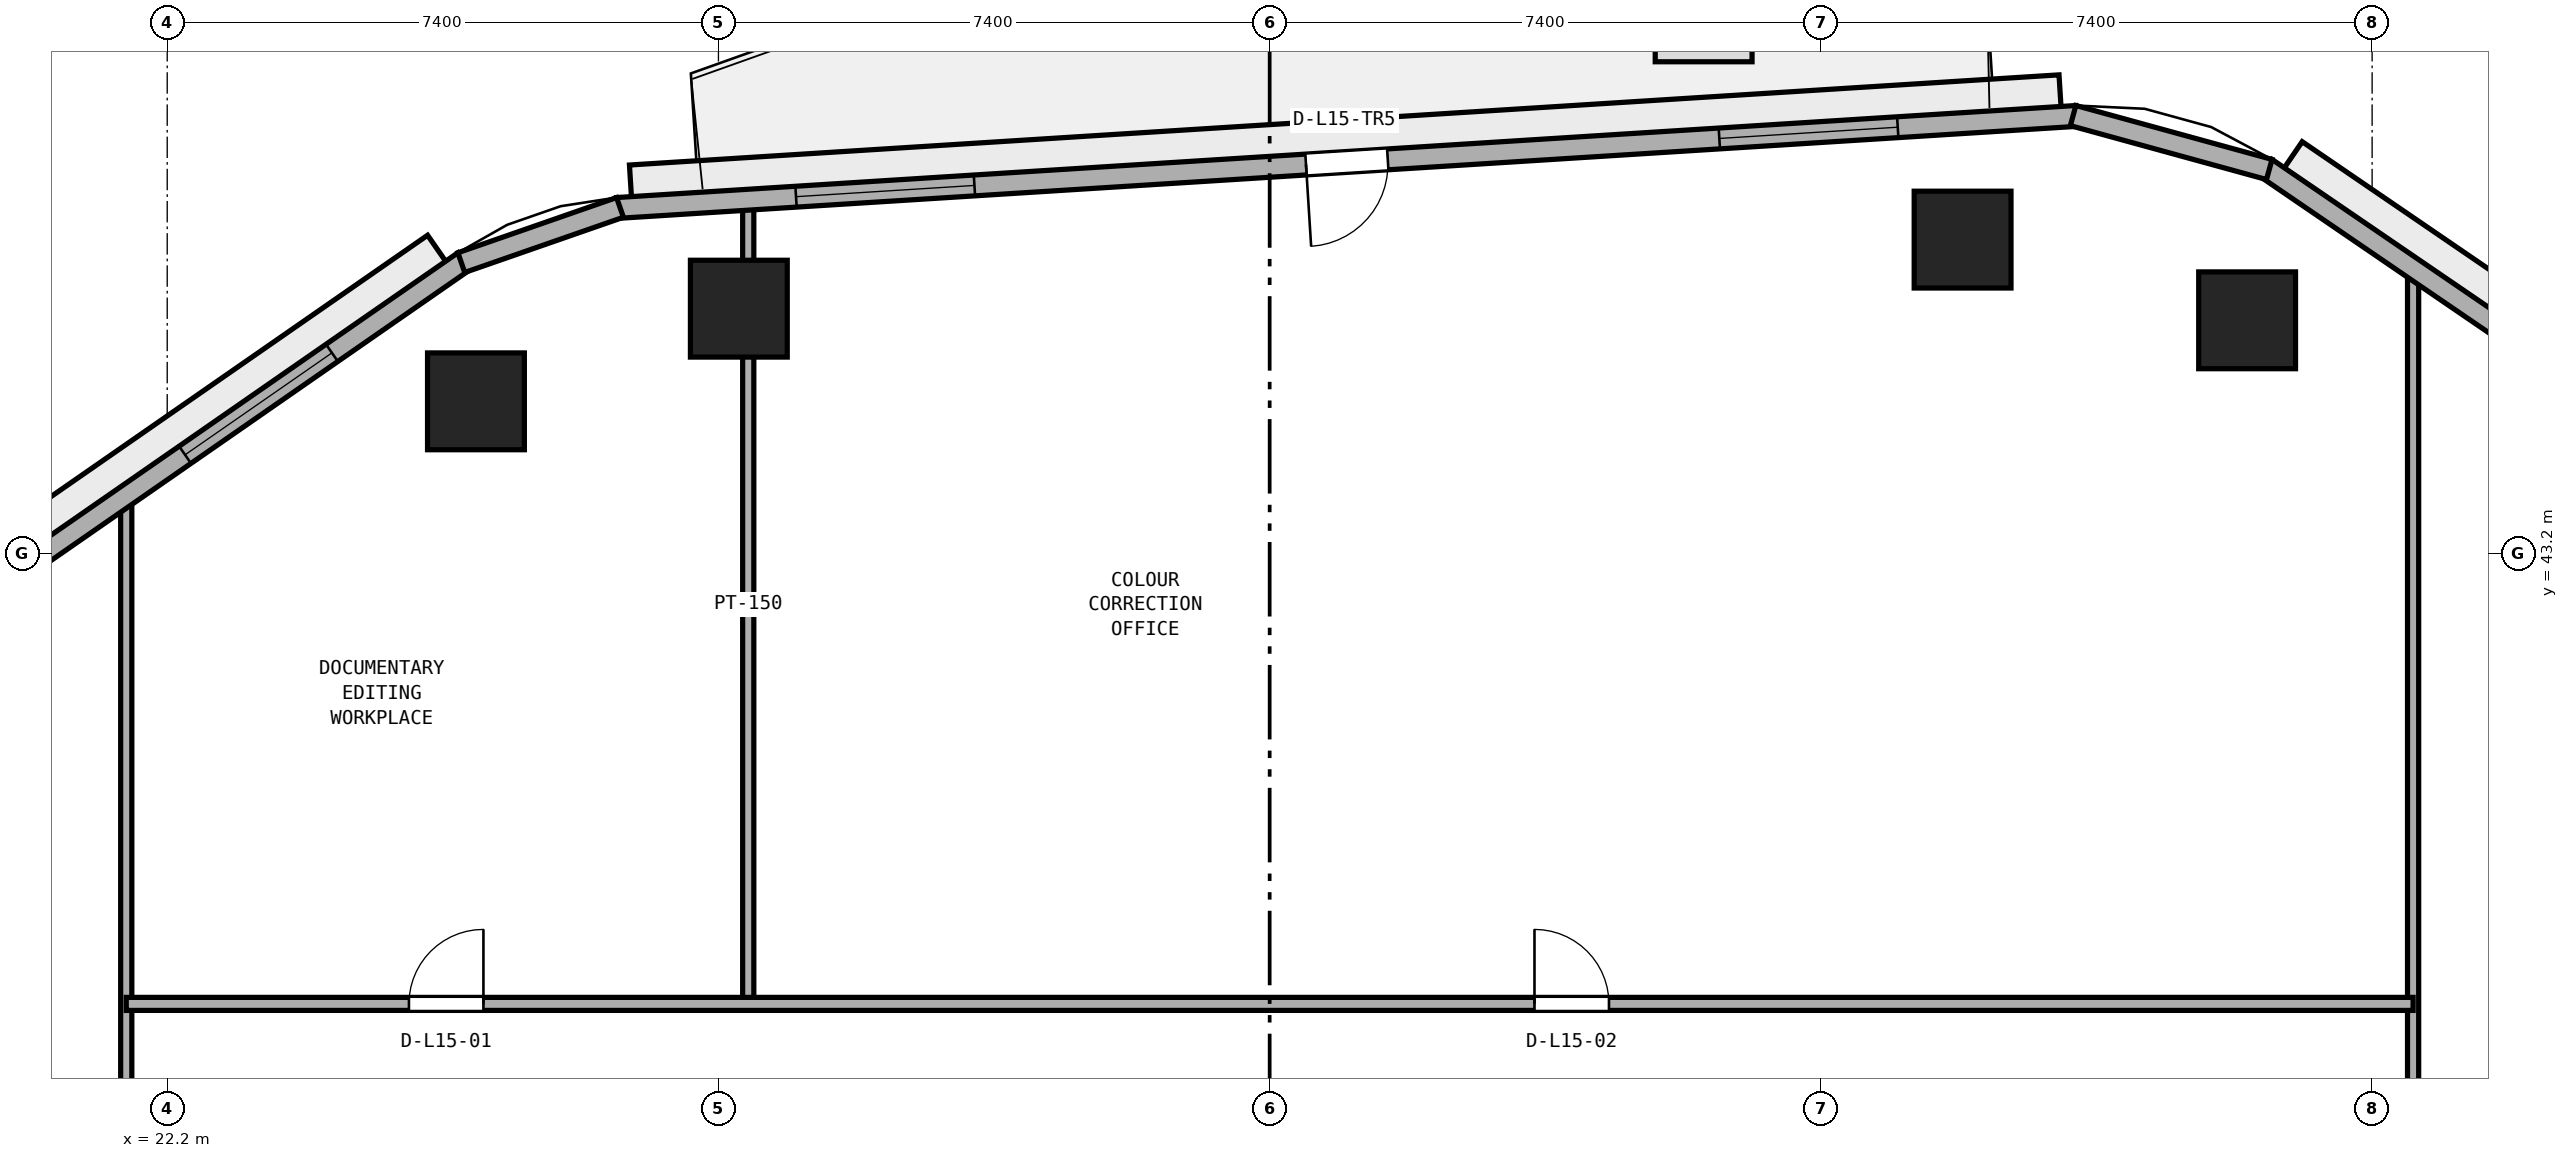
"""IFC4 building model, lengths in metres.
Left out: names, types, materials, properties, quantities, classifications, styles, units other than length and angle.
Written with IfcOpenShell. Run it as: python <this file> out.ifc"""

import sys

from ifc_helpers import new_model, si_unit, direction, frame, frame_2d, origin, origin_2d, place, context, subcontext, project, spatial, rectangle, extrude, element, fill, save


model = new_model("IFC4")
c1 = context("Model", 3, precision=1e-05, world=origin(), true_north=direction((0.0, 1.0)))
c2 = subcontext(c1, "Body", "Model", "MODEL_VIEW")
j1 = project(units=[si_unit("LENGTHUNIT", "METRE"), si_unit("PLANEANGLEUNIT", "RADIAN")], contexts=[c1])
p1 = place(None, origin())
s1 = spatial("IfcSite", under=j1, at=p1, CompositionType="ELEMENT")
p2 = place(p1, origin())
s2 = spatial("IfcBuilding", under=s1, at=p2, CompositionType="ELEMENT")
p3 = place(p2, frame((0.0, 0.0, 63.0)))
s3 = spatial("IfcBuildingStorey", under=s2, at=p3, CompositionType="ELEMENT", Elevation=63.0)
for number, where, z_axis, x_axis in (
    (1, (50.122, 46.326, 0.0), (0.0, 0.0, 1.0), (1.0, 0.0, 0.0)),
    (2, (46.302, 47.409, 0.0), (0.0, 0.0, 1.0), (1.0, 0.0, 0.0)),
    (3, (29.874, 46.482, 0.0), (0.0, 0.0, 1.0), (1.0, 0.0, 0.0)),
    (4, (26.344, 45.238, 0.0), (0.0, 0.0, 1.0), (1.0, 0.0, 0.0)),
):
    element("IfcColumn", number, at=place(p3, frame(where, z_axis=z_axis, x_axis=x_axis)), inside=s3, PredefinedType="COLUMN", context=c2, shape_type="SweptSolid", body=[
        extrude(rectangle(XDim=1.3, YDim=1.3, at=origin_2d()), origin(), (0.0, 0.0, 1.0), 3.8),
    ])
p4 = place(p3, frame((52.35, 3.611, 0.0), z_axis=(0.0, 0.0, 1.0), x_axis=(0.0, 1.0, 0.0)))
e5 = element("IfcWall", 5, at=p4, inside=s3, PredefinedType="PARTITIONING", context=c2, shape_type="SweptSolid", body=[
    extrude(rectangle(XDim=43.441, YDim=0.15, at=frame_2d((21.72, 0.0))), origin(), (0.0, 0.0, 1.0), 3.525),
])
p5 = place(p4, frame((12.364, 0.0, 0.0)))
e6 = element("IfcOpeningElement", 6, at=p5, cuts=e5, PredefinedType="OPENING", context=c2, shape_type="SweptSolid", body=[
    extrude(rectangle(XDim=0.9, YDim=2.1, at=frame_2d((0.45, 1.05))), frame((0.0, 0.085, 0.0), z_axis=(0.0, -1.0, 0.0), x_axis=(1.0, 0.0, 0.0)), (0.0, 0.0, 1.0), 0.17),
])
p6 = place(p4, frame((18.889, 0.0, 0.0)))
e7 = element("IfcOpeningElement", 7, at=p6, cuts=e5, PredefinedType="OPENING", context=c2, shape_type="SweptSolid", body=[
    extrude(rectangle(XDim=1.0, YDim=2.12, at=frame_2d((0.5, 1.06))), frame((0.0, 0.085, 0.0), z_axis=(0.0, -1.0, 0.0), x_axis=(1.0, 0.0, 0.0)), (0.0, 0.0, 1.0), 0.17),
])
p7 = place(p4, frame((25.689, 0.0, 0.0)))
e8 = element("IfcOpeningElement", 8, at=p7, cuts=e5, PredefinedType="OPENING", context=c2, shape_type="SweptSolid", body=[
    extrude(rectangle(XDim=1.0, YDim=2.12, at=frame_2d((0.5, 1.06))), frame((0.0, 0.085, 0.0), z_axis=(0.0, -1.0, 0.0), x_axis=(1.0, 0.0, 0.0)), (0.0, 0.0, 1.0), 0.17),
])
p8 = place(p4, frame((31.114, 0.0, 0.0)))
e9 = element("IfcOpeningElement", 9, at=p8, cuts=e5, PredefinedType="OPENING", context=c2, shape_type="SweptSolid", body=[
    extrude(rectangle(XDim=0.9, YDim=2.1, at=frame_2d((0.45, 1.05))), frame((0.0, 0.085, 0.0), z_axis=(0.0, -1.0, 0.0), x_axis=(1.0, 0.0, 0.0)), (0.0, 0.0, 1.0), 0.17),
])
p9 = place(p3, frame((30.0, 37.15, 0.0), z_axis=(0.0, 0.0, 1.0), x_axis=(0.0, 1.0, 0.0)))
e10 = element("IfcWall", 10, at=p9, inside=s3, PredefinedType="PARTITIONING", context=c2, shape_type="SweptSolid", body=[
    extrude(rectangle(XDim=10.73, YDim=0.15, at=frame_2d((5.365, 0.0))), origin(), (0.0, 0.0, 1.0), 2.908),
])
p10 = place(p3, frame((21.65, 6.119, 0.0), z_axis=(0.0, 0.0, 1.0), x_axis=(0.0, 1.0, 0.0)))
e11 = element("IfcWall", 11, at=p10, inside=s3, PredefinedType="PARTITIONING", context=c2, shape_type="SweptSolid", body=[
    extrude(rectangle(XDim=37.884, YDim=0.15, at=frame_2d((18.942, 0.0))), origin(), (0.0, 0.0, 1.0), 3.525),
])
p11 = place(p10, frame((13.556, 0.0, 0.0)))
e12 = element("IfcOpeningElement", 12, at=p11, cuts=e11, PredefinedType="OPENING", context=c2, shape_type="SweptSolid", body=[
    extrude(rectangle(XDim=0.9, YDim=2.1, at=frame_2d((0.45, 1.05))), frame((0.0, 0.085, 0.0), z_axis=(0.0, -1.0, 0.0), x_axis=(1.0, 0.0, 0.0)), (0.0, 0.0, 1.0), 0.17),
])
p12 = place(p10, frame((25.506, 0.0, 0.0)))
e13 = element("IfcOpeningElement", 13, at=p12, cuts=e11, PredefinedType="OPENING", context=c2, shape_type="SweptSolid", body=[
    extrude(rectangle(XDim=0.9, YDim=2.1, at=frame_2d((0.45, 1.05))), frame((0.0, 0.085, 0.0), z_axis=(0.0, -1.0, 0.0), x_axis=(1.0, 0.0, 0.0)), (0.0, 0.0, 1.0), 0.17),
])
p13 = place(p3, frame((21.65, 37.15, 0.0), z_axis=(0.0, 0.0, 1.0), x_axis=(1.0, 0.0, 0.0)))
e14 = element("IfcWall", 14, at=p13, inside=s3, PredefinedType="PARTITIONING", context=c2, shape_type="SweptSolid", body=[
    extrude(rectangle(XDim=30.7, YDim=0.175, at=frame_2d((15.35, 0.0))), origin(), (0.0, 0.0, 1.0), 3.525),
])
p14 = place(p13, frame((3.795, 0.0, 0.0)))
e15 = element("IfcOpeningElement", 15, at=p14, cuts=e14, PredefinedType="OPENING", context=c2, shape_type="SweptSolid", body=[
    extrude(rectangle(XDim=1.0, YDim=2.12, at=frame_2d((0.5, 1.06))), frame((0.0, 0.097, 0.0), z_axis=(0.0, -1.0, 0.0), x_axis=(1.0, 0.0, 0.0)), (0.0, 0.0, 1.0), 0.195),
])
p15 = place(p13, frame((18.905, 0.0, 0.0)))
e16 = element("IfcOpeningElement", 16, at=p15, cuts=e14, PredefinedType="OPENING", context=c2, shape_type="SweptSolid", body=[
    extrude(rectangle(XDim=1.0, YDim=2.12, at=frame_2d((0.5, 1.06))), frame((0.0, 0.097, 0.0), z_axis=(0.0, -1.0, 0.0), x_axis=(1.0, 0.0, 0.0)), (0.0, 0.0, 1.0), 0.195),
])
p16 = place(p3, frame((64.29, 38.867, 0.0), z_axis=(0.0, 0.0, 1.0), x_axis=(-0.825755550159, 0.564028165416, 0.0)))
e17 = element("IfcWall", 17, at=p16, inside=s3, PredefinedType="STANDARD", context=c2, shape_type="SweptSolid", body=[
    extrude(rectangle(XDim=16.848, YDim=0.28, at=frame_2d((8.424, 0.0))), origin(), (0.0, 0.0, 1.0), 3.525),
])
p17 = place(p16, frame((1.941, 0.0, 0.9)))
e18 = element("IfcOpeningElement", 18, at=p17, cuts=e17, PredefinedType="OPENING", context=c2, shape_type="SweptSolid", body=[
    extrude(rectangle(XDim=2.4, YDim=1.75, at=frame_2d((1.2, 0.875))), frame((0.0, 0.15, 0.0), z_axis=(0.0, -1.0, 0.0), x_axis=(1.0, 0.0, 0.0)), (0.0, 0.0, 1.0), 0.3),
])
p18 = place(p16, frame((7.224, 0.0, 0.9)))
e19 = element("IfcOpeningElement", 19, at=p18, cuts=e17, PredefinedType="OPENING", context=c2, shape_type="SweptSolid", body=[
    extrude(rectangle(XDim=2.4, YDim=1.75, at=frame_2d((1.2, 0.875))), frame((0.0, 0.15, 0.0), z_axis=(0.0, -1.0, 0.0), x_axis=(1.0, 0.0, 0.0)), (0.0, 0.0, 1.0), 0.3),
])
p19 = place(p3, frame((47.832, 49.069, 0.0), z_axis=(0.0, 0.0, 1.0), x_axis=(-0.998017725054, -0.062933460723, 0.0)))
e20 = element("IfcWall", 20, at=p19, inside=s3, PredefinedType="STANDARD", context=c2, shape_type="SweptSolid", body=[
    extrude(rectangle(XDim=19.629, YDim=0.28, at=frame_2d((9.815, 0.0))), origin(), (0.0, 0.0, 1.0), 3.525),
])
p20 = place(p19, frame((9.265, 0.0, 0.0)))
e21 = element("IfcOpeningElement", 21, at=p20, cuts=e20, PredefinedType="OPENING", context=c2, shape_type="SweptSolid", body=[
    extrude(rectangle(XDim=1.1, YDim=2.2, at=frame_2d((0.55, 1.1))), frame((0.0, 0.15, 0.0), z_axis=(0.0, -1.0, 0.0), x_axis=(1.0, 0.0, 0.0)), (0.0, 0.0, 1.0), 0.3),
])
p21 = place(p19, frame((2.405, 0.0, 0.9)))
e22 = element("IfcOpeningElement", 22, at=p21, cuts=e20, PredefinedType="OPENING", context=c2, shape_type="SweptSolid", body=[
    extrude(rectangle(XDim=2.4, YDim=1.75, at=frame_2d((1.2, 0.875))), frame((0.0, 0.15, 0.0), z_axis=(0.0, -1.0, 0.0), x_axis=(1.0, 0.0, 0.0)), (0.0, 0.0, 1.0), 0.3),
])
p22 = place(p19, frame((14.825, 0.0, 0.9)))
e23 = element("IfcOpeningElement", 23, at=p22, cuts=e20, PredefinedType="OPENING", context=c2, shape_type="SweptSolid", body=[
    extrude(rectangle(XDim=2.4, YDim=1.75, at=frame_2d((1.2, 0.875))), frame((0.0, 0.15, 0.0), z_axis=(0.0, -1.0, 0.0), x_axis=(1.0, 0.0, 0.0)), (0.0, 0.0, 1.0), 0.3),
])
p23 = place(p3, frame((26.182, 47.118, 0.0), z_axis=(0.0, 0.0, 1.0), x_axis=(-0.821547956627, -0.570139417127, 0.0)))
e24 = element("IfcWall", 24, at=p23, inside=s3, PredefinedType="STANDARD", context=c2, shape_type="SweptSolid", body=[
    extrude(rectangle(XDim=18.132, YDim=0.28, at=frame_2d((9.066, 0.0))), origin(), (0.0, 0.0, 1.0), 3.525),
])
p24 = place(p23, frame((2.156, 0.0, 0.9)))
e25 = element("IfcOpeningElement", 25, at=p24, cuts=e24, PredefinedType="OPENING", context=c2, shape_type="SweptSolid", body=[
    extrude(rectangle(XDim=2.4, YDim=1.75, at=frame_2d((1.2, 0.875))), frame((0.0, 0.15, 0.0), z_axis=(0.0, -1.0, 0.0), x_axis=(1.0, 0.0, 0.0)), (0.0, 0.0, 1.0), 0.3),
])
p25 = place(p23, frame((7.866, 0.0, 0.9)))
e26 = element("IfcOpeningElement", 26, at=p25, cuts=e24, PredefinedType="OPENING", context=c2, shape_type="SweptSolid", body=[
    extrude(rectangle(XDim=2.4, YDim=1.75, at=frame_2d((1.2, 0.875))), frame((0.0, 0.15, 0.0), z_axis=(0.0, -1.0, 0.0), x_axis=(1.0, 0.0, 0.0)), (0.0, 0.0, 1.0), 0.3),
])
p26 = place(p23, frame((13.577, 0.0, 0.9)))
e27 = element("IfcOpeningElement", 27, at=p26, cuts=e24, PredefinedType="OPENING", context=c2, shape_type="SweptSolid", body=[
    extrude(rectangle(XDim=2.4, YDim=1.75, at=frame_2d((1.2, 0.875))), frame((0.0, 0.15, 0.0), z_axis=(0.0, -1.0, 0.0), x_axis=(1.0, 0.0, 0.0)), (0.0, 0.0, 1.0), 0.3),
])
p27 = place(p3, frame((50.419, 48.351, 0.0), z_axis=(0.0, 0.0, 1.0), x_axis=(-0.964254516967, 0.264977784933, 0.0)))
e28 = element("IfcWall", 28, at=p27, inside=s3, PredefinedType="STANDARD", context=c2, shape_type="SweptSolid", body=[
    extrude(rectangle(XDim=2.731, YDim=0.28, at=frame_2d((1.365, 0.0))), origin(), (0.0, 0.0, 1.0), 3.525),
])
p28 = place(p3, frame((28.278, 47.842, 0.0), z_axis=(0.0, 0.0, 1.0), x_axis=(-0.9444559001, -0.328638179106, 0.0)))
e29 = element("IfcWall", 29, at=p28, inside=s3, PredefinedType="STANDARD", context=c2, shape_type="SweptSolid", body=[
    extrude(rectangle(XDim=2.255, YDim=0.28, at=frame_2d((1.128, 0.0))), origin(), (0.0, 0.0, 1.0), 3.525),
])
p29 = place(p14, origin())
e30 = element("IfcDoor", 30, at=p29, inside=s3, OperationType="SINGLE_SWING_RIGHT", PredefinedType="DOOR", context=c2, shape_type="SweptSolid", body=[
    extrude(rectangle(XDim=1.0, YDim=2.12, at=frame_2d((0.5, 1.06))), frame((0.0, 0.025, 0.0), z_axis=(0.0, -1.0, 0.0), x_axis=(1.0, 0.0, 0.0)), (0.0, 0.0, 1.0), 0.05),
])
fill(e15, e30)
p30 = place(p15, origin())
e31 = element("IfcDoor", 31, at=p30, inside=s3, OperationType="SINGLE_SWING_LEFT", PredefinedType="DOOR", context=c2, shape_type="SweptSolid", body=[
    extrude(rectangle(XDim=1.0, YDim=2.12, at=frame_2d((0.5, 1.06))), frame((0.0, 0.025, 0.0), z_axis=(0.0, -1.0, 0.0), x_axis=(1.0, 0.0, 0.0)), (0.0, 0.0, 1.0), 0.05),
])
fill(e16, e31)
p31 = place(p20, origin())
e32 = element("IfcDoor", 32, at=p31, inside=s3, OperationType="SINGLE_SWING_RIGHT", PredefinedType="DOOR", context=c2, shape_type="SweptSolid", body=[
    extrude(rectangle(XDim=1.1, YDim=2.2, at=frame_2d((0.55, 1.1))), frame((0.0, 0.025, 0.0), z_axis=(0.0, -1.0, 0.0), x_axis=(1.0, 0.0, 0.0)), (0.0, 0.0, 1.0), 0.05),
])
fill(e21, e32)
p32 = place(p21, origin())
e33 = element("IfcWindow", 33, at=p32, inside=s3, PartitioningType="SINGLE_PANEL", PredefinedType="WINDOW", context=c2, shape_type="SweptSolid", body=[
    extrude(rectangle(XDim=2.4, YDim=1.75, at=frame_2d((1.2, 0.875))), frame((0.0, 0.03, 0.0), z_axis=(0.0, -1.0, 0.0), x_axis=(1.0, 0.0, 0.0)), (0.0, 0.0, 1.0), 0.06),
])
fill(e22, e33)
p33 = place(p22, origin())
e34 = element("IfcWindow", 34, at=p33, inside=s3, PartitioningType="SINGLE_PANEL", PredefinedType="WINDOW", context=c2, shape_type="SweptSolid", body=[
    extrude(rectangle(XDim=2.4, YDim=1.75, at=frame_2d((1.2, 0.875))), frame((0.0, 0.03, 0.0), z_axis=(0.0, -1.0, 0.0), x_axis=(1.0, 0.0, 0.0)), (0.0, 0.0, 1.0), 0.06),
])
fill(e23, e34)
p34 = place(p24, origin())
e35 = element("IfcWindow", 35, at=p34, inside=s3, PartitioningType="SINGLE_PANEL", PredefinedType="WINDOW", context=c2, shape_type="SweptSolid", body=[
    extrude(rectangle(XDim=2.4, YDim=1.75, at=frame_2d((1.2, 0.875))), frame((0.0, 0.03, 0.0), z_axis=(0.0, -1.0, 0.0), x_axis=(1.0, 0.0, 0.0)), (0.0, 0.0, 1.0), 0.06),
])
fill(e25, e35)
save(model, sys.argv[1])
